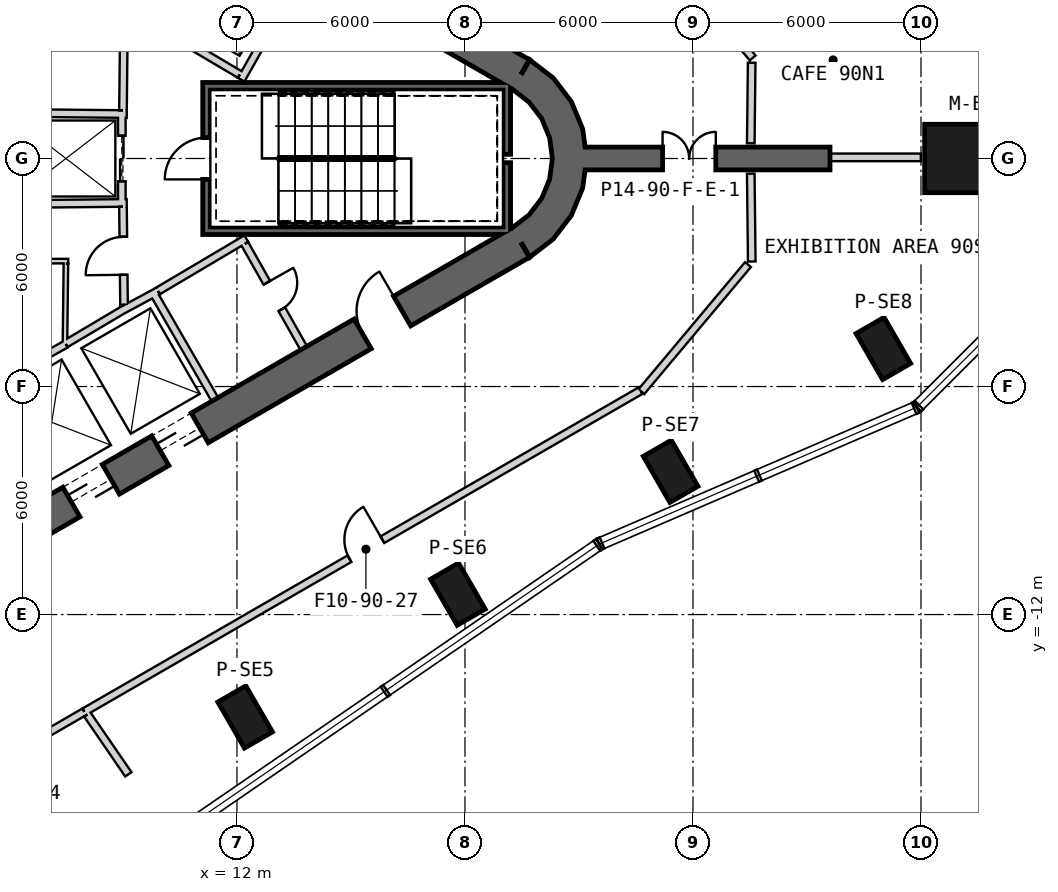
"""IFC4 building model, lengths in metres.
Left out: names, types, materials, properties, quantities, classifications, styles, units other than length and angle.
Written with IfcOpenShell. Run it as: python <this file> out.ifc"""

import sys

from ifc_helpers import new_model, si_unit, direction, frame, frame_2d, origin, origin_2d, place, context, subcontext, project, spatial, polyline, rectangle, outline, extrude, element, fill, save


model = new_model("IFC4")
c1 = context("Model", 3, precision=1e-05, world=origin(), true_north=direction((0.0, 1.0)))
c2 = subcontext(c1, "Body", "Model", "MODEL_VIEW")
j1 = project(units=[si_unit("LENGTHUNIT", "METRE"), si_unit("PLANEANGLEUNIT", "RADIAN")], contexts=[c1])
p1 = place(None, origin())
s1 = spatial("IfcSite", under=j1, at=p1, CompositionType="ELEMENT")
p2 = place(p1, origin())
s2 = spatial("IfcBuilding", under=s1, at=p2, CompositionType="ELEMENT")
p3 = place(p2, frame((0.0, 0.0, 392.3)))
s3 = spatial("IfcBuildingStorey", under=s2, at=p3, CompositionType="ELEMENT", Elevation=392.3)
p4 = place(p3, frame((31.196, 0.0, 0.0), z_axis=(0.0, 0.0, 1.0), x_axis=(1.0, 0.0, 0.0)))
e1 = element("IfcColumn", 1, at=p4, inside=s3, PredefinedType="COLUMN", context=c2, shape_type="SweptSolid", body=[
    extrude(rectangle(XDim=2.2, YDim=1.8, at=origin_2d()), origin(), (0.0, 0.0, 1.0), 5.7),
])
for number, where, z_axis, x_axis in (
    (2, (6.618, -17.927, 0.0), (0.0, 0.0, 1.0), (0.5, -0.866, 0.0)),
    (3, (12.216, -14.695, 0.0), (0.0, 0.0, 1.0), (0.5, -0.866, 0.0)),
    (4, (17.814, -11.463, 0.0), (0.0, 0.0, 1.0), (0.5, -0.866, 0.0)),
    (5, (23.412, -8.231, 0.0), (0.0, 0.0, 1.0), (0.5, -0.866, 0.0)),
    (6, (29.01, -4.999, 0.0), (0.0, 0.0, 1.0), (0.5, -0.866, 0.0)),
):
    element("IfcColumn", number, at=place(p3, frame(where, z_axis=z_axis, x_axis=x_axis)), inside=s3, PredefinedType="COLUMN", context=c2, shape_type="SweptSolid", body=[
        extrude(rectangle(XDim=1.4, YDim=0.85, at=origin_2d()), origin(), (0.0, 0.0, 1.0), 5.7),
    ])
p5 = place(p3, frame((19.475, 2.208, 0.0), z_axis=(0.0, 0.0, 1.0), x_axis=(-0.866028369851, 0.499994862586, 0.0)))
e7 = element("IfcWall", 7, at=p5, inside=s3, PredefinedType="SHEAR", context=c2, shape_type="SweptSolid", body=[
    extrude(rectangle(XDim=31.523, YDim=0.9, at=frame_2d((15.762, 0.0))), origin(), (0.0, 0.0, 1.0), 6.0),
])
p6 = place(p5, frame((7.062, 0.0, 0.0)))
e8 = element("IfcOpeningElement", 8, at=p6, cuts=e7, PredefinedType="OPENING", context=c2, shape_type="SweptSolid", body=[
    extrude(rectangle(XDim=1.2, YDim=2.4, at=frame_2d((0.6, 1.2))), frame((0.0, 0.46, 0.0), z_axis=(0.0, -1.0, 0.0), x_axis=(1.0, 0.0, 0.0)), (0.0, 0.0, 1.0), 0.92),
])
p7 = place(p5, frame((3.612, 0.0, 0.0)))
e9 = element("IfcOpeningElement", 9, at=p7, cuts=e7, PredefinedType="OPENING", context=c2, shape_type="SweptSolid", body=[
    extrude(rectangle(XDim=1.2, YDim=2.4, at=frame_2d((0.6, 1.2))), frame((0.0, 0.46, 0.0), z_axis=(0.0, -1.0, 0.0), x_axis=(1.0, 0.0, 0.0)), (0.0, 0.0, 1.0), 0.92),
])
p8 = place(p5, frame((26.712, 0.0, 0.0)))
e10 = element("IfcOpeningElement", 10, at=p8, cuts=e7, PredefinedType="OPENING", context=c2, shape_type="SweptSolid", body=[
    extrude(rectangle(XDim=1.2, YDim=2.4, at=frame_2d((0.6, 1.2))), frame((0.0, 0.46, 0.0), z_axis=(0.0, -1.0, 0.0), x_axis=(1.0, 0.0, 0.0)), (0.0, 0.0, 1.0), 0.92),
])
p9 = place(p3, frame((-7.825, -17.97, 0.0), z_axis=(0.0, 0.0, 1.0), x_axis=(0.866028369851, 0.499994862586, 0.0)))
e11 = element("IfcWall", 11, at=p9, inside=s3, PredefinedType="SHEAR", context=c2, shape_type="SweptSolid", body=[
    extrude(rectangle(XDim=31.523, YDim=0.9, at=frame_2d((15.762, 0.0))), origin(), (0.0, 0.0, 1.0), 6.0),
])
p10 = place(p9, frame((7.062, 0.0, 0.0)))
e12 = element("IfcOpeningElement", 12, at=p10, cuts=e11, PredefinedType="OPENING", context=c2, shape_type="SweptSolid", body=[
    extrude(rectangle(XDim=1.2, YDim=2.4, at=frame_2d((0.6, 1.2))), frame((0.0, 0.46, 0.0), z_axis=(0.0, -1.0, 0.0), x_axis=(1.0, 0.0, 0.0)), (0.0, 0.0, 1.0), 0.92),
])
p11 = place(p9, frame((9.762, 0.0, 0.0)))
e13 = element("IfcOpeningElement", 13, at=p11, cuts=e11, PredefinedType="OPENING", context=c2, shape_type="SweptSolid", body=[
    extrude(rectangle(XDim=1.2, YDim=2.4, at=frame_2d((0.6, 1.2))), frame((0.0, 0.46, 0.0), z_axis=(0.0, -1.0, 0.0), x_axis=(1.0, 0.0, 0.0)), (0.0, 0.0, 1.0), 0.92),
])
p12 = place(p9, frame((17.862, 0.0, 0.0)))
e14 = element("IfcOpeningElement", 14, at=p12, cuts=e11, PredefinedType="OPENING", context=c2, shape_type="SweptSolid", body=[
    extrude(rectangle(XDim=1.2, YDim=2.4, at=frame_2d((0.6, 1.2))), frame((0.0, 0.46, 0.0), z_axis=(0.0, -1.0, 0.0), x_axis=(1.0, 0.0, 0.0)), (0.0, 0.0, 1.0), 0.92),
])
p13 = place(p9, frame((20.562, 0.0, 0.0)))
e15 = element("IfcOpeningElement", 15, at=p13, cuts=e11, PredefinedType="OPENING", context=c2, shape_type="SweptSolid", body=[
    extrude(rectangle(XDim=1.2, YDim=2.4, at=frame_2d((0.6, 1.2))), frame((0.0, 0.46, 0.0), z_axis=(0.0, -1.0, 0.0), x_axis=(1.0, 0.0, 0.0)), (0.0, 0.0, 1.0), 0.92),
])
p14 = place(p9, frame((26.712, 0.0, 0.0)))
e16 = element("IfcOpeningElement", 16, at=p14, cuts=e11, PredefinedType="OPENING", context=c2, shape_type="SweptSolid", body=[
    extrude(rectangle(XDim=1.2, YDim=2.4, at=frame_2d((0.6, 1.2))), frame((0.0, 0.46, 0.0), z_axis=(0.0, -1.0, 0.0), x_axis=(1.0, 0.0, 0.0)), (0.0, 0.0, 1.0), 0.92),
])
p15 = place(p9, frame((3.612, 0.0, 0.0)))
e17 = element("IfcOpeningElement", 17, at=p15, cuts=e11, PredefinedType="OPENING", context=c2, shape_type="SweptSolid", body=[
    extrude(rectangle(XDim=1.2, YDim=2.4, at=frame_2d((0.6, 1.2))), frame((0.0, 0.46, 0.0), z_axis=(0.0, -1.0, 0.0), x_axis=(1.0, 0.0, 0.0)), (0.0, 0.0, 1.0), 0.92),
])
p16 = place(p3, origin())
e18 = element("IfcWall", 18, at=p16, inside=s3, PredefinedType="SHEAR", context=c2, shape_type="SweptSolid", body=[
    extrude(outline(polyline([(19.7, -2.598), (20.321, -2.121), (20.798, -1.5), (21.098, -0.777), (21.2, 0.0), (21.098, 0.777), (20.798, 1.5), (20.321, 2.121), (19.7, 2.598), (19.25, 1.819), (19.685, 1.485), (20.019, 1.05), (20.229, 0.543), (20.3, 0.0), (20.229, -0.543), (20.019, -1.05), (19.685, -1.485), (19.25, -1.819), (19.7, -2.598)])), origin(), (0.0, 0.0, 1.0), 6.0),
])
p17 = place(p3, frame((21.15, 0.0, 0.0), z_axis=(0.0, 0.0, 1.0), x_axis=(1.0, 0.0, 0.0)))
e19 = element("IfcWall", 19, at=p17, inside=s3, PredefinedType="SHEAR", context=c2, shape_type="SweptSolid", body=[
    extrude(rectangle(XDim=6.455, YDim=0.6, at=frame_2d((3.228, 0.0))), origin(), (0.0, 0.0, 1.0), 6.0),
])
p18 = place(p17, frame((2.05, 0.0, 0.0)))
e20 = element("IfcOpeningElement", 20, at=p18, cuts=e19, PredefinedType="OPENING", context=c2, shape_type="SweptSolid", body=[
    extrude(rectangle(XDim=1.4, YDim=2.4, at=frame_2d((0.7, 1.2))), frame((0.0, 0.31, 0.0), z_axis=(0.0, -1.0, 0.0), x_axis=(1.0, 0.0, 0.0)), (0.0, 0.0, 1.0), 0.62),
])
p19 = place(p3, frame((12.11, 2.073, 0.0), z_axis=(0.0, 0.0, 1.0), x_axis=(0.49196600604, 0.870614408852, 0.0)))
e21 = element("IfcWall", 21, at=p19, inside=s3, PredefinedType="PLUMBINGWALL", context=c2, shape_type="SweptSolid", body=[
    extrude(rectangle(XDim=3.35, YDim=0.2, at=frame_2d((1.675, 0.0))), origin(), (0.0, 0.0, 1.0), 5.7),
])
p20 = place(p3, frame((12.073, 2.211, 0.0), z_axis=(0.0, 0.0, 1.0), x_axis=(-0.860414880418, 0.509594185166, 0.0)))
e22 = element("IfcWall", 22, at=p20, inside=s3, PredefinedType="PLUMBINGWALL", context=c2, shape_type="SweptSolid", body=[
    extrude(rectangle(XDim=2.7, YDim=0.2, at=frame_2d((1.35, 0.0))), origin(), (0.0, 0.0, 1.0), 5.7),
])
p21 = place(p3, frame((5.231, -6.161, 0.0), z_axis=(0.0, 0.0, 1.0), x_axis=(0.871540428464, 0.4903236498, 0.0)))
e23 = element("IfcWall", 23, at=p21, inside=s3, PredefinedType="PLUMBINGWALL", context=c2, shape_type="SweptSolid", body=[
    extrude(rectangle(XDim=2.6, YDim=0.2, at=frame_2d((1.3, 0.0))), origin(), (0.0, 0.0, 1.0), 5.7),
])
p22 = place(p3, frame((9.795, -3.525, 0.0), z_axis=(0.0, 0.0, 1.0), x_axis=(0.499984717929, -0.866034226713, 0.0)))
e24 = element("IfcWall", 24, at=p22, inside=s3, PredefinedType="PLUMBINGWALL", context=c2, shape_type="SweptSolid", body=[
    extrude(rectangle(XDim=3.25, YDim=0.2, at=frame_2d((1.625, 0.0))), origin(), (0.0, 0.0, 1.0), 5.7),
])
p23 = place(p3, frame((8.974, -3.999, 0.0), z_axis=(0.0, 0.0, 1.0), x_axis=(0.880907015104, 0.473289373154, 0.0)))
e25 = element("IfcWall", 25, at=p23, inside=s3, PredefinedType="PLUMBINGWALL", context=c2, shape_type="SweptSolid", body=[
    extrude(rectangle(XDim=1.078, YDim=0.2, at=frame_2d((0.539, 0.0))), origin(), (0.0, 0.0, 1.0), 5.7),
])
p24 = place(p3, frame((7.493, -4.878, 0.0), z_axis=(0.0, 0.0, 1.0), x_axis=(0.859981807212, 0.510324691999, 0.0)))
e26 = element("IfcWall", 26, at=p24, inside=s3, PredefinedType="PLUMBINGWALL", context=c2, shape_type="SweptSolid", body=[
    extrude(rectangle(XDim=1.845, YDim=0.2, at=frame_2d((0.922, 0.0))), origin(), (0.0, 0.0, 1.0), 5.7),
])
p25 = place(p3, frame((19.2, 1.9, -0.35), z_axis=(0.0, 0.0, 1.0), x_axis=(-1.0, 0.0, 0.0)))
e27 = element("IfcWall", 27, at=p25, inside=s3, PredefinedType="SHEAR", context=c2, shape_type="SweptSolid", body=[
    extrude(rectangle(XDim=8.1, YDim=0.2, at=frame_2d((4.05, 0.0))), origin(), (0.0, 0.0, 1.0), 6.05),
])
p26 = place(p3, frame((19.1, -2.0, -0.35), z_axis=(0.0, 0.0, 1.0), x_axis=(0.0, 1.0, 0.0)))
e28 = element("IfcWall", 28, at=p26, inside=s3, PredefinedType="SHEAR", context=c2, shape_type="SweptSolid", body=[
    extrude(rectangle(XDim=1.89, YDim=0.2, at=frame_2d((0.945, 0.0))), origin(), (0.0, 0.0, 1.0), 6.05),
])
p27 = place(p3, frame((19.1, 0.11, -0.35), z_axis=(0.0, 0.0, 1.0), x_axis=(0.0, 1.0, 0.0)))
e29 = element("IfcWall", 29, at=p27, inside=s3, PredefinedType="SHEAR", context=c2, shape_type="SweptSolid", body=[
    extrude(rectangle(XDim=1.69, YDim=0.2, at=frame_2d((0.845, 0.0))), origin(), (0.0, 0.0, 1.0), 6.05),
])
p28 = place(p3, frame((11.1, -1.9, -0.35), z_axis=(0.0, 0.0, 1.0), x_axis=(1.0, 0.0, 0.0)))
e30 = element("IfcWall", 30, at=p28, inside=s3, PredefinedType="SHEAR", context=c2, shape_type="SweptSolid", body=[
    extrude(rectangle(XDim=7.9, YDim=0.2, at=frame_2d((3.95, 0.0))), origin(), (0.0, 0.0, 1.0), 6.05),
])
p29 = place(p3, frame((11.2, -1.8, -0.35), z_axis=(0.0, 0.0, 1.0), x_axis=(0.0, 1.0, 0.0)))
e31 = element("IfcWall", 31, at=p29, inside=s3, PredefinedType="SHEAR", context=c2, shape_type="SweptSolid", body=[
    extrude(rectangle(XDim=3.6, YDim=0.2, at=frame_2d((1.8, 0.0))), origin(), (0.0, 0.0, 1.0), 6.05),
])
p30 = place(p29, frame((1.25, 0.0, 0.35)))
e32 = element("IfcOpeningElement", 32, at=p30, cuts=e31, PredefinedType="OPENING", context=c2, shape_type="SweptSolid", body=[
    extrude(rectangle(XDim=1.1, YDim=2.1, at=frame_2d((0.55, 1.05))), frame((0.0, 0.11, 0.0), z_axis=(0.0, -1.0, 0.0), x_axis=(1.0, 0.0, 0.0)), (0.0, 0.0, 1.0), 0.22),
])
p31 = place(p3, frame((8.97, 1.2, 0.0), z_axis=(0.0, 0.0, 1.0), x_axis=(0.0, -1.0, 0.0)))
e33 = element("IfcWall", 33, at=p31, inside=s3, PredefinedType="PLUMBINGWALL", context=c2, shape_type="SweptSolid", body=[
    extrude(rectangle(XDim=2.4, YDim=0.2, at=frame_2d((1.2, 0.0))), origin(), (0.0, 0.0, 1.0), 5.7),
])
p32 = place(p31, frame((0.6, 0.0, 0.0)))
e34 = element("IfcOpeningElement", 34, at=p32, cuts=e33, PredefinedType="OPENING", context=c2, shape_type="SweptSolid", body=[
    extrude(rectangle(XDim=1.2, YDim=2.4, at=frame_2d((0.6, 1.2))), frame((0.0, 0.11, 0.0), z_axis=(0.0, -1.0, 0.0), x_axis=(1.0, 0.0, 0.0)), (0.0, 0.0, 1.0), 0.22),
])
p33 = place(p3, frame((6.0, 1.2, 0.0), z_axis=(0.0, 0.0, 1.0), x_axis=(0.999949988, -0.010001074852, 0.0)))
e35 = element("IfcWall", 35, at=p33, inside=s3, PredefinedType="PLUMBINGWALL", context=c2, shape_type="SweptSolid", body=[
    extrude(rectangle(XDim=3.1, YDim=0.2, at=frame_2d((1.55, 0.0))), origin(), (0.0, 0.0, 1.0), 5.7),
])
p34 = place(p3, frame((5.9, -1.201, 0.0), z_axis=(0.0, 0.0, 1.0), x_axis=(0.999950064753, 0.009993397809, 0.0)))
e36 = element("IfcWall", 36, at=p34, inside=s3, PredefinedType="PLUMBINGWALL", context=c2, shape_type="SweptSolid", body=[
    extrude(rectangle(XDim=3.2, YDim=0.2, at=frame_2d((1.6, 0.0))), origin(), (0.0, 0.0, 1.0), 5.7),
])
p35 = place(p3, frame((12.245, -2.109, 0.0), z_axis=(0.0, 0.0, 1.0), x_axis=(-0.860414880418, -0.509594185166, 0.0)))
e37 = element("IfcWall", 37, at=p35, inside=s3, PredefinedType="PARTITIONING", context=c2, shape_type="SweptSolid", body=[
    extrude(rectangle(XDim=2.7, YDim=0.2, at=frame_2d((1.35, 0.0))), origin(), (0.0, 0.0, 1.0), 5.7),
])
p36 = place(p3, frame((13.758, -4.99, 0.0), z_axis=(0.0, 0.0, 1.0), x_axis=(-0.491993409184, 0.87059892334, 0.0)))
e38 = element("IfcWall", 38, at=p36, inside=s3, PredefinedType="PARTITIONING", context=c2, shape_type="SweptSolid", body=[
    extrude(rectangle(XDim=3.15, YDim=0.2, at=frame_2d((1.575, 0.0))), origin(), (0.0, 0.0, 1.0), 5.7),
])
p37 = place(p36, frame((1.175, 0.0, 0.0)))
e39 = element("IfcOpeningElement", 39, at=p37, cuts=e38, PredefinedType="OPENING", context=c2, shape_type="SweptSolid", body=[
    extrude(rectangle(XDim=0.8, YDim=2.1, at=frame_2d((0.4, 1.05))), frame((0.0, 0.11, 0.0), z_axis=(0.0, -1.0, 0.0), x_axis=(1.0, 0.0, 0.0)), (0.0, 0.0, 1.0), 0.22),
])
p38 = place(p3, frame((9.001, 1.27, 0.0), z_axis=(0.0, 0.0, 1.0), x_axis=(0.01074821465, 0.999942236273, 0.0)))
e40 = element("IfcWall", 40, at=p38, inside=s3, PredefinedType="PARTITIONING", context=c2, shape_type="SweptSolid", body=[
    extrude(rectangle(XDim=2.726, YDim=0.2, at=frame_2d((1.363, 0.0))), origin(), (0.0, 0.0, 1.0), 5.7),
])
p39 = place(p3, frame((9.029, -3.851, 0.0), z_axis=(0.0, 0.0, 1.0), x_axis=(-0.010783593937, 0.99994185536, 0.0)))
e41 = element("IfcWall", 41, at=p39, inside=s3, PredefinedType="PARTITIONING", context=c2, shape_type="SweptSolid", body=[
    extrude(rectangle(XDim=2.581, YDim=0.2, at=frame_2d((1.291, 0.0))), origin(), (0.0, 0.0, 1.0), 5.7),
])
p40 = place(p39, frame((0.791, 0.0, 0.0)))
e42 = element("IfcOpeningElement", 42, at=p40, cuts=e41, PredefinedType="OPENING", context=c2, shape_type="SweptSolid", body=[
    extrude(rectangle(XDim=1.0, YDim=2.1, at=frame_2d((0.5, 1.05))), frame((0.0, 0.11, 0.0), z_axis=(0.0, -1.0, 0.0), x_axis=(1.0, 0.0, 0.0)), (0.0, 0.0, 1.0), 0.22),
])
p41 = place(p3, frame((7.56, -2.7, 0.0), z_axis=(0.0, 0.0, 1.0), x_axis=(-1.0, 0.0, 0.0)))
e43 = element("IfcWall", 43, at=p41, inside=s3, PredefinedType="PARTITIONING", context=c2, shape_type="SweptSolid", body=[
    extrude(rectangle(XDim=3.0, YDim=0.12, at=frame_2d((1.5, 0.0))), origin(), (0.0, 0.0, 1.0), 5.7),
])
p42 = place(p3, frame((7.475, -4.865, 0.0), z_axis=(0.0, 0.0, 1.0), x_axis=(0.011716133148, 0.999931363757, 0.0)))
e44 = element("IfcWall", 44, at=p42, inside=s3, PredefinedType="PARTITIONING", context=c2, shape_type="SweptSolid", body=[
    extrude(rectangle(XDim=2.105, YDim=0.12, at=frame_2d((1.052, 0.0))), origin(), (0.0, 0.0, 1.0), 5.7),
])
p43 = place(p3, frame((25.57, 2.646, 0.0), z_axis=(0.0, 0.0, 1.0), x_axis=(-0.642788443189, 0.766043743727, 0.0)))
e45 = element("IfcWall", 45, at=p43, inside=s3, PredefinedType="PARTITIONING", context=c2, shape_type="SweptSolid", body=[
    extrude(rectangle(XDim=4.356, YDim=0.2, at=frame_2d((2.178, 0.0))), origin(), (0.0, 0.0, 1.0), 5.07),
])
p44 = place(p3, frame((25.521, 0.4, 0.0), z_axis=(0.0, 0.0, 1.0), x_axis=(0.011167985113, 0.99993763611, 0.0)))
e46 = element("IfcWall", 46, at=p44, inside=s3, PredefinedType="PARTITIONING", context=c2, shape_type="SweptSolid", body=[
    extrude(rectangle(XDim=2.121, YDim=0.2, at=frame_2d((1.06, 0.0))), origin(), (0.0, 0.0, 1.0), 5.7),
])
p45 = place(p3, frame((27.605, 0.03, 0.0), z_axis=(0.0, 0.0, 1.0), x_axis=(1.0, 0.0, 0.0)))
e47 = element("IfcWall", 47, at=p45, inside=s3, PredefinedType="PARTITIONING", context=c2, shape_type="SweptSolid", body=[
    extrude(rectangle(XDim=2.391, YDim=0.2, at=frame_2d((1.195, 0.0))), origin(), (0.0, 0.0, 1.0), 5.27),
])
p46 = place(p3, frame((-6.192, -22.743, 0.0), z_axis=(0.0, 0.0, 1.0), x_axis=(0.86602812093, 0.499995293736, 0.0)))
e48 = element("IfcWall", 48, at=p46, inside=s3, PredefinedType="PARTITIONING", context=c2, shape_type="SweptSolid", body=[
    extrude(rectangle(XDim=16.369, YDim=0.2, at=frame_2d((8.185, 0.0))), origin(), (0.0, 0.0, 1.0), 5.07),
])
p47 = place(p46, frame((7.7, 0.0, 0.0)))
e49 = element("IfcOpeningElement", 49, at=p47, cuts=e48, PredefinedType="OPENING", context=c2, shape_type="SweptSolid", body=[
    extrude(rectangle(XDim=1.0, YDim=2.1, at=frame_2d((0.5, 1.05))), frame((0.0, 0.11, 0.0), z_axis=(0.0, -1.0, 0.0), x_axis=(1.0, 0.0, 0.0)), (0.0, 0.0, 1.0), 0.22),
])
p48 = place(p3, frame((7.984, -14.559, 0.0), z_axis=(0.0, 0.0, 1.0), x_axis=(0.866028009752, 0.499995486305, 0.0)))
e50 = element("IfcWall", 50, at=p48, inside=s3, PredefinedType="PARTITIONING", context=c2, shape_type="SweptSolid", body=[
    extrude(rectangle(XDim=16.9, YDim=0.2, at=frame_2d((8.45, 0.0))), origin(), (0.0, 0.0, 1.0), 5.07),
])
p49 = place(p48, frame((8.056, 0.0, 0.0)))
e51 = element("IfcOpeningElement", 51, at=p49, cuts=e50, PredefinedType="OPENING", context=c2, shape_type="SweptSolid", body=[
    extrude(rectangle(XDim=1.0, YDim=2.1, at=frame_2d((0.5, 1.05))), frame((0.0, 0.11, 0.0), z_axis=(0.0, -1.0, 0.0), x_axis=(1.0, 0.0, 0.0)), (0.0, 0.0, 1.0), 0.22),
])
p50 = place(p3, frame((25.547, -2.711, 0.0), z_axis=(0.0, 0.0, 1.0), x_axis=(-0.011197269672, 0.999937308611, 0.0)))
e52 = element("IfcWall", 52, at=p50, inside=s3, PredefinedType="PARTITIONING", context=c2, shape_type="SweptSolid", body=[
    extrude(rectangle(XDim=2.311, YDim=0.2, at=frame_2d((1.156, 0.0))), origin(), (0.0, 0.0, 1.0), 5.7),
])
p51 = place(p3, frame((22.642, -6.135, 0.0), z_axis=(0.0, 0.0, 1.0), x_axis=(0.642782763857, 0.766048509227, 0.0)))
e53 = element("IfcWall", 53, at=p51, inside=s3, PredefinedType="PARTITIONING", context=c2, shape_type="SweptSolid", body=[
    extrude(rectangle(XDim=4.365, YDim=0.2, at=frame_2d((2.183, 0.0))), origin(), (0.0, 0.0, 1.0), 5.07),
])
p52 = place(p3, frame((8.062, -14.629, 0.0), z_axis=(0.0, 0.0, 1.0), x_axis=(0.565801599427, -0.824541418054, 0.0)))
e54 = element("IfcWall", 54, at=p52, inside=s3, PredefinedType="PARTITIONING", context=c2, shape_type="SweptSolid", body=[
    extrude(rectangle(XDim=1.91, YDim=0.2, at=frame_2d((0.955, 0.0))), origin(), (0.0, 0.0, 1.0), 4.07),
])
p53 = place(p30, origin())
e55 = element("IfcDoor", 55, at=p53, inside=s3, OperationType="SINGLE_SWING_LEFT", PredefinedType="USERDEFINED", context=c2, shape_type="SweptSolid", body=[
    extrude(rectangle(XDim=1.1, YDim=2.1, at=frame_2d((0.55, 1.05))), frame((0.0, 0.025, 0.0), z_axis=(0.0, -1.0, 0.0), x_axis=(1.0, 0.0, 0.0)), (0.0, 0.0, 1.0), 0.05),
])
fill(e32, e55)
p54 = place(p40, origin())
e56 = element("IfcDoor", 56, at=p54, inside=s3, OperationType="SINGLE_SWING_LEFT", PredefinedType="USERDEFINED", context=c2, shape_type="SweptSolid", body=[
    extrude(rectangle(XDim=1.0, YDim=2.1, at=frame_2d((0.5, 1.05))), frame((0.0, 0.025, 0.0), z_axis=(0.0, -1.0, 0.0), x_axis=(1.0, 0.0, 0.0)), (0.0, 0.0, 1.0), 0.05),
])
fill(e42, e56)
p55 = place(p32, origin())
e57 = element("IfcDoor", 57, at=p55, inside=s3, OperationType="SLIDING_TO_LEFT", PredefinedType="USERDEFINED", context=c2, shape_type="SweptSolid", body=[
    extrude(rectangle(XDim=1.2, YDim=2.4, at=frame_2d((0.6, 1.2))), frame((0.0, 0.025, 0.0), z_axis=(0.0, -1.0, 0.0), x_axis=(1.0, 0.0, 0.0)), (0.0, 0.0, 1.0), 0.05),
])
fill(e34, e57)
p56 = place(p37, origin())
e58 = element("IfcDoor", 58, at=p56, inside=s3, OperationType="SINGLE_SWING_RIGHT", PredefinedType="USERDEFINED", context=c2, shape_type="SweptSolid", body=[
    extrude(rectangle(XDim=0.8, YDim=2.1, at=frame_2d((0.4, 1.05))), frame((0.0, 0.025, 0.0), z_axis=(0.0, -1.0, 0.0), x_axis=(1.0, 0.0, 0.0)), (0.0, 0.0, 1.0), 0.05),
])
fill(e39, e58)
p57 = place(p49, origin())
e59 = element("IfcDoor", 59, at=p57, inside=s3, OperationType="SINGLE_SWING_RIGHT", PredefinedType="USERDEFINED", context=c2, shape_type="SweptSolid", body=[
    extrude(rectangle(XDim=1.0, YDim=2.1, at=frame_2d((0.5, 1.05))), frame((0.0, 0.025, 0.0), z_axis=(0.0, -1.0, 0.0), x_axis=(1.0, 0.0, 0.0)), (0.0, 0.0, 1.0), 0.05),
])
fill(e51, e59)
p58 = place(p12, origin())
e60 = element("IfcDoor", 60, at=p58, inside=s3, OperationType="SLIDING_TO_LEFT", PredefinedType="USERDEFINED", context=c2, shape_type="SweptSolid", body=[
    extrude(rectangle(XDim=1.2, YDim=2.4, at=frame_2d((0.6, 1.2))), frame((0.0, 0.025, 0.0), z_axis=(0.0, -1.0, 0.0), x_axis=(1.0, 0.0, 0.0)), (0.0, 0.0, 1.0), 0.05),
])
fill(e14, e60)
p59 = place(p13, origin())
e61 = element("IfcDoor", 61, at=p59, inside=s3, OperationType="SLIDING_TO_LEFT", PredefinedType="USERDEFINED", context=c2, shape_type="SweptSolid", body=[
    extrude(rectangle(XDim=1.2, YDim=2.4, at=frame_2d((0.6, 1.2))), frame((0.0, 0.025, 0.0), z_axis=(0.0, -1.0, 0.0), x_axis=(1.0, 0.0, 0.0)), (0.0, 0.0, 1.0), 0.05),
])
fill(e15, e61)
p60 = place(p14, origin())
e62 = element("IfcDoor", 62, at=p60, inside=s3, OperationType="SINGLE_SWING_RIGHT", PredefinedType="USERDEFINED", context=c2, shape_type="SweptSolid", body=[
    extrude(rectangle(XDim=1.2, YDim=2.4, at=frame_2d((0.6, 1.2))), frame((0.0, 0.025, 0.0), z_axis=(0.0, -1.0, 0.0), x_axis=(1.0, 0.0, 0.0)), (0.0, 0.0, 1.0), 0.05),
])
fill(e16, e62)
p61 = place(p18, origin())
e63 = element("IfcDoor", 63, at=p61, inside=s3, OperationType="DOUBLE_DOOR_SINGLE_SWING", PredefinedType="NOTDEFINED", context=c2, shape_type="SweptSolid", body=[
    extrude(rectangle(XDim=1.4, YDim=2.4, at=frame_2d((0.7, 1.2))), frame((0.0, 0.025, 0.0), z_axis=(0.0, -1.0, 0.0), x_axis=(1.0, 0.0, 0.0)), (0.0, 0.0, 1.0), 0.05),
])
fill(e20, e63)
save(model, sys.argv[1])
